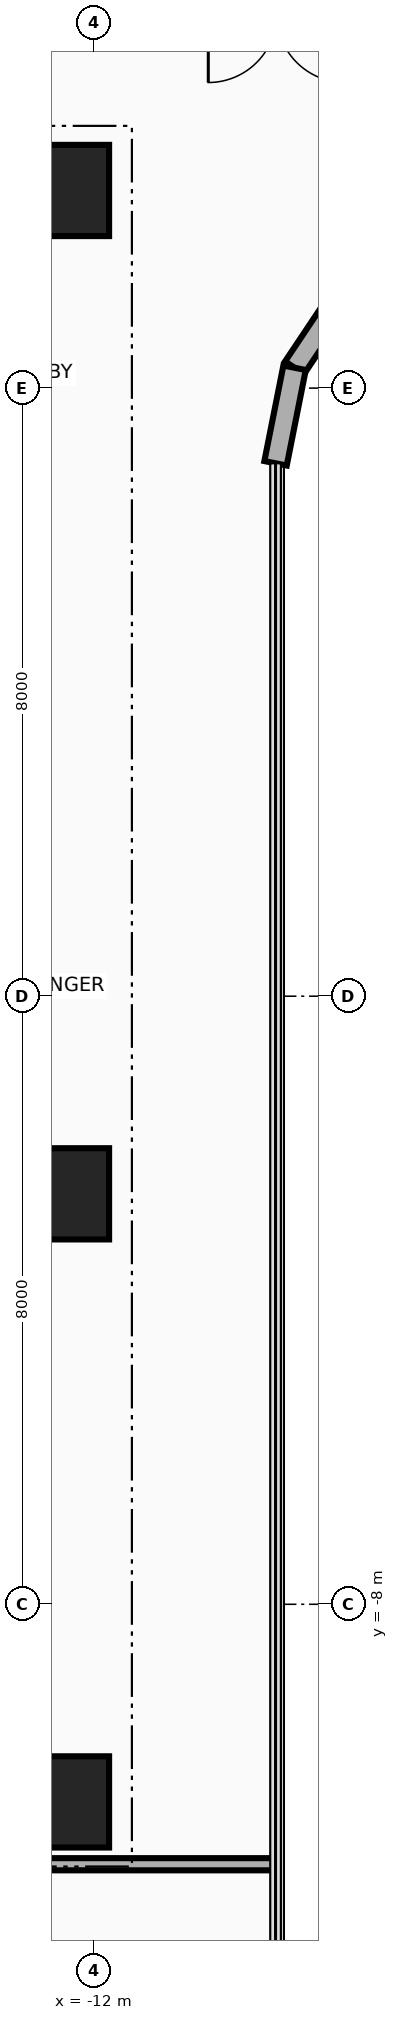
"""IFC4 building model, lengths in metres.
Left out: names, types, materials, properties, quantities, classifications, styles, units other than length and angle.
Written with IfcOpenShell. Run it as: python <this file> out.ifc"""

import sys

from ifc_helpers import new_model, si_unit, direction, frame, frame_2d, origin, origin_2d, place, context, subcontext, project, spatial, rectangle, extrude, source, transform, mapped, element, save


model = new_model("IFC4")
c1 = context("Model", 3, precision=1e-05, world=origin(), true_north=direction((0.0, 1.0)))
c2 = subcontext(c1, "Body", "Model", "MODEL_VIEW")
j1 = project(units=[si_unit("LENGTHUNIT", "METRE"), si_unit("PLANEANGLEUNIT", "RADIAN")], contexts=[c1])
p1 = place(None, origin())
s1 = spatial("IfcSite", under=j1, at=p1, CompositionType="ELEMENT")
p2 = place(p1, origin())
s2 = spatial("IfcBuilding", under=s1, at=p2, CompositionType="ELEMENT")
p3 = place(p2, frame((0.0, 0.0, 135.3)))
s3 = spatial("IfcBuildingStorey", under=s2, at=p3, CompositionType="ELEMENT", Elevation=135.3)
for number, where, z_axis, x_axis in (
    (1, (-22.65, 10.8, 0.0), (0.0, 0.0, 1.0), (1.0, 0.0, 0.0)),
    (2, (-22.65, -10.8, 0.0), (0.0, 0.0, 1.0), (1.0, 0.0, 0.0)),
):
    element("IfcWall", number, at=place(p3, frame(where, z_axis=z_axis, x_axis=x_axis)), inside=s3, PredefinedType="SHEAR", context=c2, shape_type="SweptSolid", body=[
        extrude(rectangle(XDim=10.25, YDim=0.7, at=frame_2d((5.125, 0.0))), origin(), (0.0, 0.0, 1.0), 3.46),
    ])
m1 = source(origin(), c2, "Body", "SweptSolid", [
    extrude(rectangle(XDim=1.2, YDim=1.2, at=origin_2d()), origin(), (0.0, 0.0, 1.0), 3.7),
])
for number, where, z_axis, x_axis in (
    (3, (-12.4, -10.6, 0.0), (0.0, 0.0, 1.0), (1.0, 0.0, 0.0)),
    (4, (-12.4, -2.6, 0.0), (0.0, 0.0, 1.0), (1.0, 0.0, 0.0)),
    (5, (-12.4, 10.6, 0.0), (0.0, 0.0, 1.0), (1.0, 0.0, 0.0)),
):
    element("IfcColumn", number, at=place(p3, frame(where, z_axis=z_axis, x_axis=x_axis)), inside=s3, PredefinedType="COLUMN", context=c2, shape_type="MappedRepresentation", body=[
        mapped(m1, transform((0.0, 0.0, 0.0), x_axis=(1.0, 0.0, 0.0), y_axis=(0.0, 1.0, 0.0), z_axis=(0.0, 0.0, 1.0), scale=1.0)),
    ])
p4 = place(p3, frame((-8.642, 9.342, 0.0), z_axis=(0.0, 0.0, 1.0), x_axis=(-0.555615398575, -0.831439431869, 0.0)))
e6 = element("IfcWall", 6, at=p4, inside=s3, PredefinedType="SOLIDWALL", context=c2, shape_type="SweptSolid", body=[
    extrude(rectangle(XDim=1.292, YDim=0.3, at=frame_2d((0.646, 0.0))), origin(), (0.0, 0.0, 1.0), 3.46),
])
p5 = place(p3, frame((-9.36, 8.268, 0.0), z_axis=(0.0, 0.0, 1.0), x_axis=(-0.195090163074, -0.980785312019, 0.0)))
e7 = element("IfcWall", 7, at=p5, inside=s3, PredefinedType="SOLIDWALL", context=c2, shape_type="SweptSolid", body=[
    extrude(rectangle(XDim=1.281, YDim=0.3, at=frame_2d((0.641, 0.0))), origin(), (0.0, 0.0, 1.0), 3.46),
])
p6 = place(p3, frame((-23.45, -11.42, 0.0), z_axis=(0.0, 0.0, 1.0), x_axis=(1.0, 0.0, 0.0)))
e8 = element("IfcWall", 8, at=p6, inside=s3, PredefinedType="PARTITIONING", context=c2, shape_type="SweptSolid", body=[
    extrude(rectangle(XDim=13.84, YDim=0.16, at=frame_2d((6.92, 0.0))), origin(), (0.0, 0.0, 1.0), 2.834),
])
save(model, sys.argv[1])
